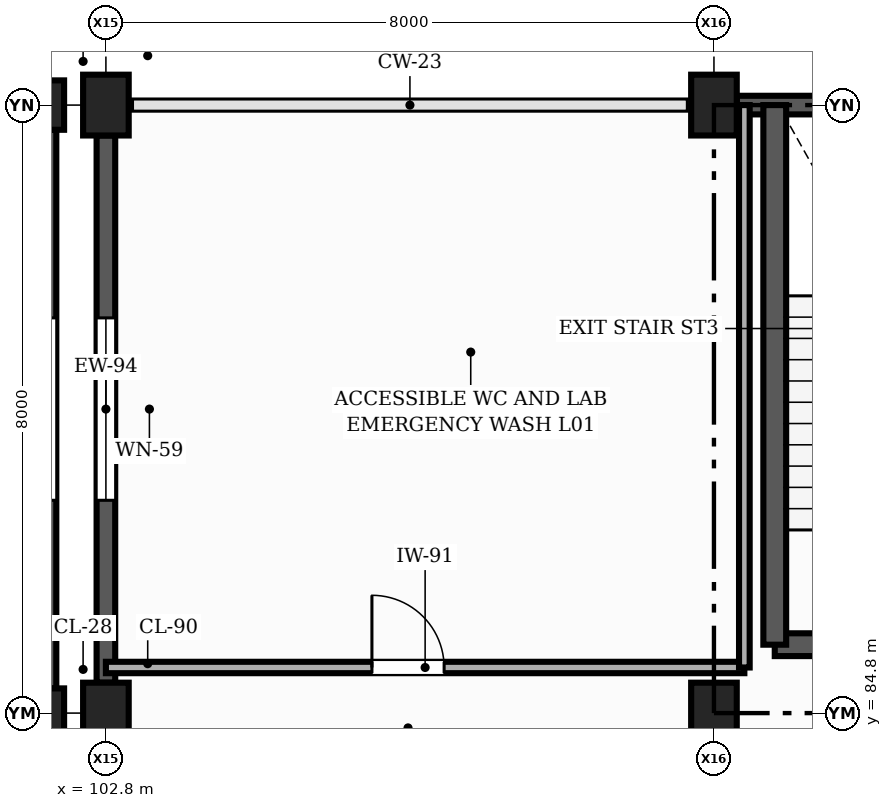
"""IFC4 building model, lengths in metres.
Left out: names, types, materials, properties, quantities, classifications, styles, units other than length and angle.
Written with IfcOpenShell. Run it as: python <this file> out.ifc"""

import sys

from ifc_helpers import new_model, si_unit, direction, frame, frame_2d, origin, origin_2d, place, context, subcontext, project, spatial, rectangle, extrude, element, fill, save


model = new_model("IFC4")
c1 = context("Model", 3, precision=1e-05, world=origin(), true_north=direction((0.0, 1.0)))
c2 = subcontext(c1, "Body", "Model", "MODEL_VIEW")
j1 = project(units=[si_unit("LENGTHUNIT", "METRE"), si_unit("PLANEANGLEUNIT", "RADIAN")], contexts=[c1])
p1 = place(None, origin())
s1 = spatial("IfcSite", under=j1, at=p1, CompositionType="ELEMENT")
p2 = place(p1, origin())
s2 = spatial("IfcBuilding", under=s1, at=p2, CompositionType="ELEMENT")
p3 = place(p2, frame((0.0, 0.0, 4.8)))
s3 = spatial("IfcBuildingStorey", under=s2, at=p3, CompositionType="ELEMENT", Elevation=4.8)
for number, where, z_axis, x_axis in (
    (1, (102.0, 84.8, 0.0), (0.0, 0.0, 1.0), (1.0, 0.0, 0.0)),
    (2, (102.0, 92.8, 0.0), (0.0, 0.0, 1.0), (1.0, 0.0, 0.0)),
):
    element("IfcColumn", number, at=place(p3, frame(where, z_axis=z_axis, x_axis=x_axis)), inside=s3, PredefinedType="COLUMN", context=c2, shape_type="SweptSolid", body=[
        extrude(rectangle(XDim=0.5, YDim=0.65, at=origin_2d()), origin(), (0.0, 0.0, 1.0), 4.2),
    ])
for number, where, z_axis, x_axis in (
    (3, (102.8, 84.8, 0.0), (0.0, 0.0, 1.0), (1.0, 0.0, 0.0)),
    (4, (102.8, 92.8, 0.0), (0.0, 0.0, 1.0), (1.0, 0.0, 0.0)),
    (5, (110.8, 84.8, 0.0), (0.0, 0.0, 1.0), (1.0, 0.0, 0.0)),
    (6, (110.8, 92.8, 0.0), (0.0, 0.0, 1.0), (1.0, 0.0, 0.0)),
):
    element("IfcColumn", number, at=place(p3, frame(where, z_axis=z_axis, x_axis=x_axis)), inside=s3, PredefinedType="COLUMN", context=c2, shape_type="SweptSolid", body=[
        extrude(rectangle(XDim=0.6, YDim=0.8, at=origin_2d()), origin(), (0.0, 0.0, 1.0), 4.2),
    ])
p4 = place(p3, frame((102.0, 85.125, 0.0), z_axis=(0.0, 0.0, 1.0), x_axis=(0.0, 1.0, 0.0)))
e7 = element("IfcWall", 7, at=p4, inside=s3, PredefinedType="SOLIDWALL", context=c2, shape_type="SweptSolid", body=[
    extrude(rectangle(XDim=7.35, YDim=0.295, at=frame_2d((3.675, 0.0))), origin(), (0.0, 0.0, 1.0), 3.26),
])
p5 = place(p4, frame((2.475, 0.0, 0.9)))
e8 = element("IfcOpeningElement", 8, at=p5, cuts=e7, PredefinedType="OPENING", context=c2, shape_type="SweptSolid", body=[
    extrude(rectangle(XDim=2.4, YDim=1.5, at=frame_2d((1.2, 0.75))), frame((0.0, 0.157, 0.0), z_axis=(0.0, -1.0, 0.0), x_axis=(1.0, 0.0, 0.0)), (0.0, 0.0, 1.0), 0.315),
])
p6 = place(p3, frame((118.5, 92.8, 0.0), z_axis=(0.0, 0.0, 1.0), x_axis=(-1.0, 0.0, 0.0)))
e9 = element("IfcWall", 9, at=p6, inside=s3, PredefinedType="SOLIDWALL", context=c2, shape_type="SweptSolid", body=[
    extrude(rectangle(XDim=7.4, YDim=0.245, at=frame_2d((3.7, 0.0))), origin(), (0.0, 0.0, 1.0), 3.91),
])
p7 = place(p3, frame((102.8, 92.4, 0.0), z_axis=(0.0, 0.0, 1.0), x_axis=(0.0, -1.0, 0.0)))
e10 = element("IfcWall", 10, at=p7, inside=s3, PredefinedType="SOLIDWALL", context=c2, shape_type="SweptSolid", body=[
    extrude(rectangle(XDim=7.2, YDim=0.245, at=frame_2d((3.6, 0.0))), origin(), (0.0, 0.0, 1.0), 3.26),
])
p8 = place(p7, frame((2.4, 0.0, 0.9)))
e11 = element("IfcOpeningElement", 11, at=p8, cuts=e10, PredefinedType="OPENING", context=c2, shape_type="SweptSolid", body=[
    extrude(rectangle(XDim=2.4, YDim=1.5, at=frame_2d((1.2, 0.75))), frame((0.0, 0.133, 0.0), z_axis=(0.0, -1.0, 0.0), x_axis=(1.0, 0.0, 0.0)), (0.0, 0.0, 1.0), 0.265),
])
p9 = place(p3, frame((111.6, 85.7, 0.0), z_axis=(0.0, 0.0, 1.0), x_axis=(1.0, 0.0, 0.0)))
e12 = element("IfcWall", 12, at=p9, inside=s3, PredefinedType="SHEAR", context=c2, shape_type="SweptSolid", body=[
    extrude(rectangle(XDim=3.22, YDim=0.3, at=frame_2d((1.61, 0.0))), origin(), (0.0, 0.0, 1.0), 4.2),
])
p10 = place(p9, frame((1.035, 0.0, 0.0)))
e13 = element("IfcOpeningElement", 13, at=p10, cuts=e12, PredefinedType="OPENING", context=c2, shape_type="SweptSolid", body=[
    extrude(rectangle(XDim=1.15, YDim=2.15, at=frame_2d((0.575, 1.075))), frame((0.0, 0.16, 0.0), z_axis=(0.0, -1.0, 0.0), x_axis=(1.0, 0.0, 0.0)), (0.0, 0.0, 1.0), 0.32),
])
p11 = place(p3, frame((111.6, 92.8, 0.0), z_axis=(0.0, 0.0, 1.0), x_axis=(0.0, -1.0, 0.0)))
e14 = element("IfcWall", 14, at=p11, inside=s3, PredefinedType="SHEAR", context=c2, shape_type="SweptSolid", body=[
    extrude(rectangle(XDim=7.1, YDim=0.3, at=frame_2d((3.55, 0.0))), origin(), (0.0, 0.0, 1.0), 4.2),
])
p12 = place(p3, frame((102.8, 85.4, 0.0), z_axis=(0.0, 0.0, 1.0), x_axis=(1.0, 0.0, 0.0)))
e15 = element("IfcWall", 15, at=p12, inside=s3, PredefinedType="PARTITIONING", context=c2, shape_type="SweptSolid", body=[
    extrude(rectangle(XDim=8.4, YDim=0.15, at=frame_2d((4.2, 0.0))), origin(), (0.0, 0.0, 1.0), 3.245),
])
p13 = place(p12, frame((3.5, 0.0, 0.0)))
e16 = element("IfcOpeningElement", 16, at=p13, cuts=e15, PredefinedType="OPENING", context=c2, shape_type="SweptSolid", body=[
    extrude(rectangle(XDim=0.95, YDim=2.15, at=frame_2d((0.475, 1.075))), frame((0.0, 0.085, 0.0), z_axis=(0.0, -1.0, 0.0), x_axis=(1.0, 0.0, 0.0)), (0.0, 0.0, 1.0), 0.17),
])
p14 = place(p3, frame((111.2, 85.4, 0.0), z_axis=(0.0, 0.0, 1.0), x_axis=(0.0, 1.0, 0.0)))
e17 = element("IfcWall", 17, at=p14, inside=s3, PredefinedType="PARTITIONING", context=c2, shape_type="SweptSolid", body=[
    extrude(rectangle(XDim=7.4, YDim=0.14, at=frame_2d((3.7, 0.0))), origin(), (0.0, 0.0, 1.0), 3.91),
])
p15 = place(p8, origin())
e18 = element("IfcWindow", 18, at=p15, inside=s3, PartitioningType="SINGLE_PANEL", PredefinedType="WINDOW", context=c2, shape_type="SweptSolid", body=[
    extrude(rectangle(XDim=2.4, YDim=1.5, at=frame_2d((1.2, 0.75))), frame((0.0, 0.03, 0.0), z_axis=(0.0, -1.0, 0.0), x_axis=(1.0, 0.0, 0.0)), (0.0, 0.0, 1.0), 0.06),
])
fill(e11, e18)
p16 = place(p13, origin())
e19 = element("IfcDoor", 19, at=p16, inside=s3, OperationType="SINGLE_SWING_LEFT", PredefinedType="DOOR", context=c2, shape_type="SweptSolid", body=[
    extrude(rectangle(XDim=0.95, YDim=2.15, at=frame_2d((0.475, 1.075))), frame((0.0, 0.025, 0.0), z_axis=(0.0, -1.0, 0.0), x_axis=(1.0, 0.0, 0.0)), (0.0, 0.0, 1.0), 0.05),
])
fill(e16, e19)
save(model, sys.argv[1])
